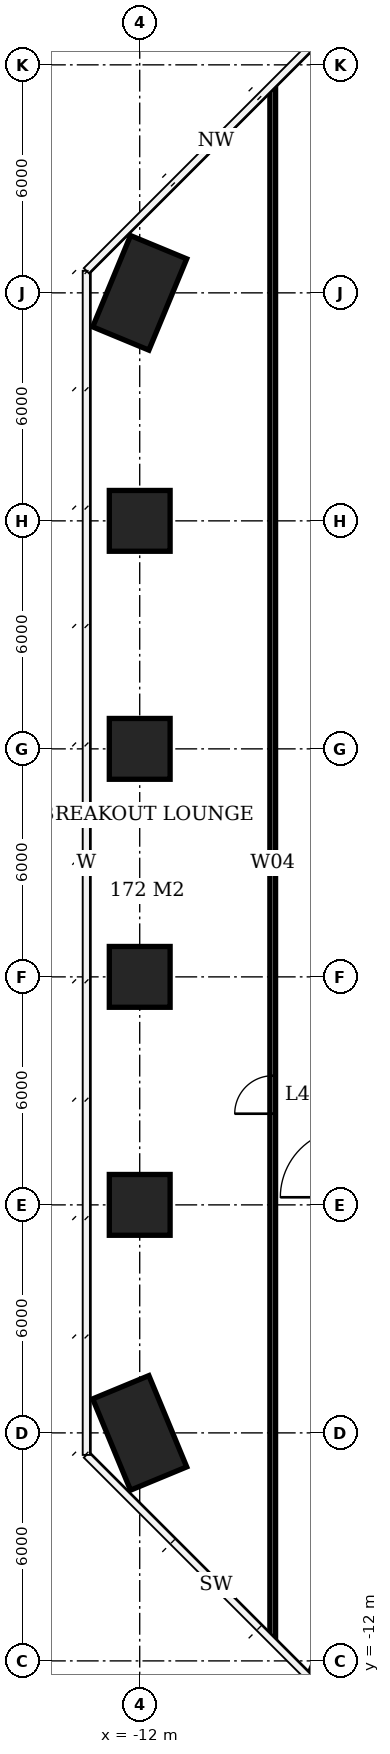
"""IFC4 building model, lengths in metres.
Left out: names, types, materials, properties, quantities, classifications, styles, units other than length and angle.
Written with IfcOpenShell. Run it as: python <this file> out.ifc"""

import sys

from ifc_helpers import new_model, si_unit, direction, frame, frame_2d, origin, origin_2d, place, context, subcontext, project, spatial, rectangle, extrude, element, fill, save


model = new_model("IFC4")
c1 = context("Model", 3, precision=1e-05, world=origin(), true_north=direction((0.0, 1.0)))
c2 = subcontext(c1, "Body", "Model", "MODEL_VIEW")
j1 = project(units=[si_unit("LENGTHUNIT", "METRE"), si_unit("PLANEANGLEUNIT", "RADIAN")], contexts=[c1])
p1 = place(None, origin())
s1 = spatial("IfcSite", under=j1, at=p1, CompositionType="ELEMENT")
p2 = place(p1, origin())
s2 = spatial("IfcBuilding", under=s1, at=p2, CompositionType="ELEMENT")
p3 = place(p2, frame((0.0, 0.0, 181.1)))
s3 = spatial("IfcBuildingStorey", under=s2, at=p3, CompositionType="ELEMENT", Elevation=181.1)
p4 = place(p3, frame((-12.0, -6.0, 0.0), z_axis=(0.0, 0.0, 1.0), x_axis=(-0.382683432365, 0.923879532511, 0.0)))
e1 = element("IfcColumn", 1, at=p4, inside=s3, PredefinedType="COLUMN", context=c2, shape_type="SweptSolid", body=[
    extrude(rectangle(XDim=2.6, YDim=1.6, at=origin_2d()), origin(), (0.0, 0.0, 1.0), 3.9),
])
for number, where, z_axis, x_axis in (
    (2, (-12.0, 0.0, 0.0), (0.0, 0.0, 1.0), (1.0, 0.0, 0.0)),
    (3, (-12.0, 6.0, 0.0), (0.0, 0.0, 1.0), (1.0, 0.0, 0.0)),
    (4, (-12.0, 12.0, 0.0), (0.0, 0.0, 1.0), (1.0, 0.0, 0.0)),
    (5, (-12.0, 18.0, 0.0), (0.0, 0.0, 1.0), (1.0, 0.0, 0.0)),
):
    element("IfcColumn", number, at=place(p3, frame(where, z_axis=z_axis, x_axis=x_axis)), inside=s3, PredefinedType="COLUMN", context=c2, shape_type="SweptSolid", body=[
        extrude(rectangle(XDim=1.6, YDim=1.6, at=origin_2d()), origin(), (0.0, 0.0, 1.0), 3.9),
    ])
for number, where, z_axis, x_axis in (
    (6, (-12.0, 24.0, 0.0), (0.0, 0.0, 1.0), (0.383, 0.924, 0.0)),
    (7, (-6.0, -12.0, 0.0), (0.0, 0.0, 1.0), (-0.924, 0.383, 0.0)),
):
    element("IfcColumn", number, at=place(p3, frame(where, z_axis=z_axis, x_axis=x_axis)), inside=s3, PredefinedType="COLUMN", context=c2, shape_type="SweptSolid", body=[
        extrude(rectangle(XDim=2.6, YDim=1.6, at=origin_2d()), origin(), (0.0, 0.0, 1.0), 3.9),
    ])
p5 = place(p3, frame((-8.5, -11.388, 0.0), z_axis=(0.0, 0.0, 1.0), x_axis=(0.0, 1.0, 0.0)))
e8 = element("IfcWall", 8, at=p5, inside=s3, PredefinedType="PARTITIONING", context=c2, shape_type="SweptSolid", body=[
    extrude(rectangle(XDim=40.776, YDim=0.15, at=frame_2d((20.388, 0.0))), origin(), (0.0, 0.0, 1.0), 3.65),
])
p6 = place(p5, frame((13.787, 0.0, 0.0)))
e9 = element("IfcOpeningElement", 9, at=p6, cuts=e8, PredefinedType="OPENING", context=c2, shape_type="SweptSolid", body=[
    extrude(rectangle(XDim=1.0, YDim=2.1, at=frame_2d((0.5, 1.05))), frame((0.0, 0.085, 0.0), z_axis=(0.0, -1.0, 0.0), x_axis=(1.0, 0.0, 0.0)), (0.0, 0.0, 1.0), 0.17),
])
p7 = place(p6, origin())
e10 = element("IfcDoor", 10, at=p7, inside=s3, OperationType="SINGLE_SWING_LEFT", PredefinedType="DOOR", context=c2, shape_type="SweptSolid", body=[
    extrude(rectangle(XDim=1.0, YDim=2.1, at=frame_2d((0.5, 1.05))), frame((0.0, 0.025, 0.0), z_axis=(0.0, -1.0, 0.0), x_axis=(1.0, 0.0, 0.0)), (0.0, 0.0, 1.0), 0.05),
])
fill(e9, e10)
save(model, sys.argv[1])
